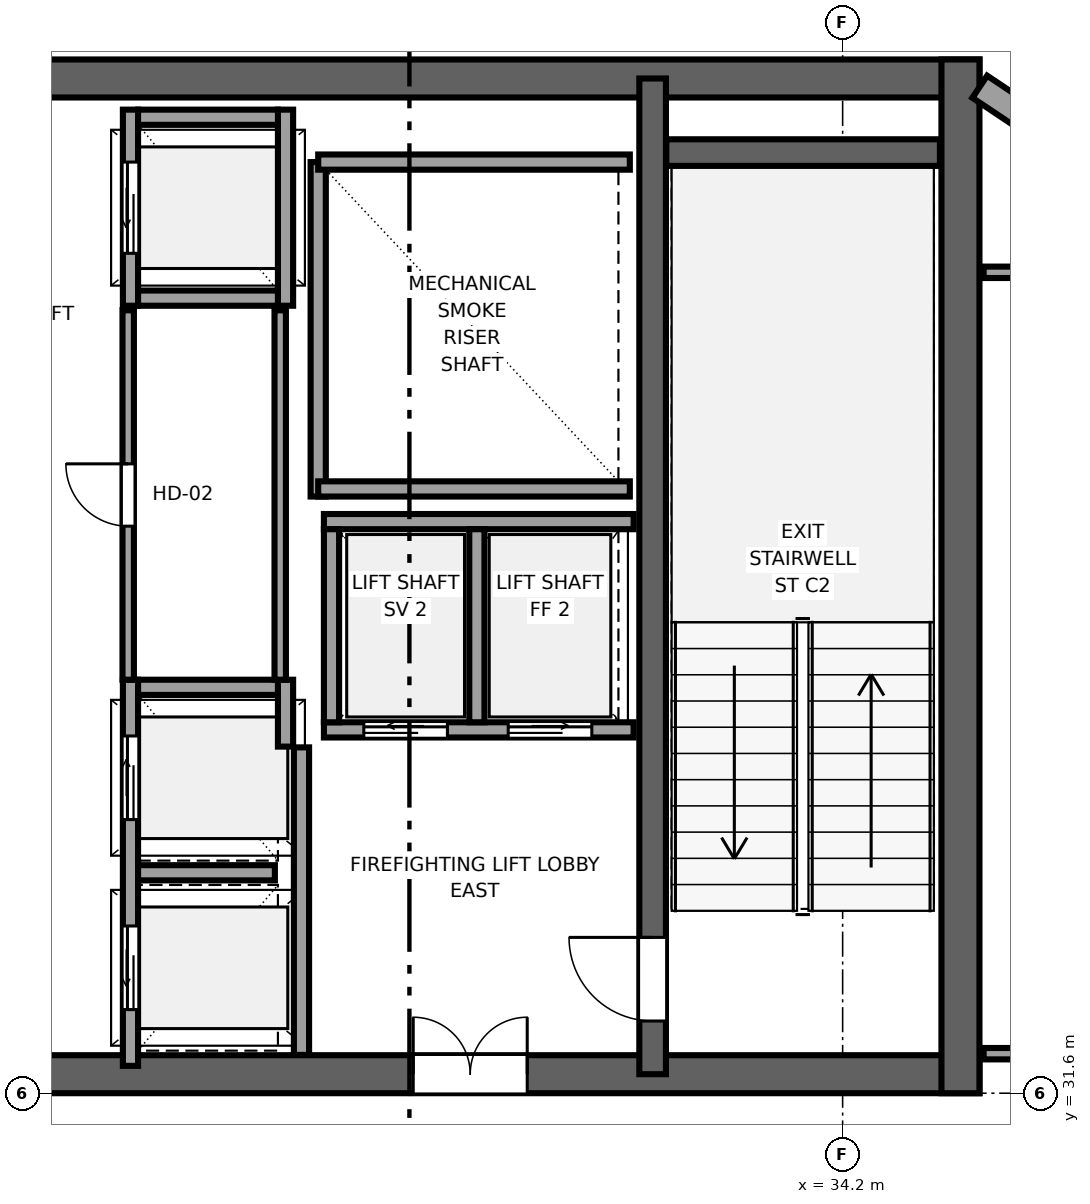
"""IFC4 building model, lengths in metres.
Left out: names, types, materials, properties, quantities, classifications, styles, units other than length and angle.
Written with IfcOpenShell. Run it as: python <this file> out.ifc"""

import sys

from ifc_helpers import new_model, si_unit, direction, frame, frame_2d, origin, place, context, subcontext, project, spatial, rectangle, extrude, source, transform, mapped, element, fill, save


model = new_model("IFC4")
c1 = context("Model", 3, precision=1e-05, world=origin(), true_north=direction((0.0, 1.0)))
c2 = subcontext(c1, "Body", "Model", "MODEL_VIEW")
j1 = project(units=[si_unit("LENGTHUNIT", "METRE"), si_unit("PLANEANGLEUNIT", "RADIAN")], contexts=[c1])
p1 = place(None, origin())
s1 = spatial("IfcSite", under=j1, at=p1, CompositionType="ELEMENT")
p2 = place(p1, origin())
s2 = spatial("IfcBuilding", under=s1, at=p2, CompositionType="ELEMENT")
p3 = place(p2, frame((0.0, 0.0, 286.55)))
s3 = spatial("IfcBuildingStorey", under=s2, at=p3, CompositionType="ELEMENT", Elevation=286.55)
p4 = place(p3, frame((10.0, 31.85, 0.0), z_axis=(0.0, 0.0, 1.0), x_axis=(1.0, 0.0, 0.0)))
e1 = element("IfcWall", 1, at=p4, inside=s3, PredefinedType="SHEAR", context=c2, shape_type="SweptSolid", body=[
    extrude(rectangle(XDim=26.0, YDim=0.5, at=frame_2d((13.0, 0.0))), origin(), (0.0, 0.0, 1.0), 4.4),
])
p5 = place(p4, frame((7.45, 0.0, 0.0), z_axis=(0.0, 0.0, 1.0), x_axis=(-1.0, 0.0, 0.0)))
e2 = element("IfcOpeningElement", 2, at=p5, cuts=e1, PredefinedType="OPENING", context=c2, shape_type="SweptSolid", body=[
    extrude(rectangle(XDim=1.5, YDim=2.04, at=frame_2d((0.75, 1.02))), frame((0.0, 0.26, 0.0), z_axis=(0.0, -1.0, 0.0), x_axis=(1.0, 0.0, 0.0)), (0.0, 0.0, 1.0), 0.52),
])
p6 = place(p4, frame((13.75, 0.0, 0.0), z_axis=(0.0, 0.0, 1.0), x_axis=(-1.0, 0.0, 0.0)))
e3 = element("IfcOpeningElement", 3, at=p6, cuts=e1, PredefinedType="OPENING", context=c2, shape_type="SweptSolid", body=[
    extrude(rectangle(XDim=1.5, YDim=2.04, at=frame_2d((0.75, 1.02))), frame((0.0, 0.26, 0.0), z_axis=(0.0, -1.0, 0.0), x_axis=(1.0, 0.0, 0.0)), (0.0, 0.0, 1.0), 0.52),
])
p7 = place(p4, frame((20.05, 0.0, 0.0), z_axis=(0.0, 0.0, 1.0), x_axis=(-1.0, 0.0, 0.0)))
e4 = element("IfcOpeningElement", 4, at=p7, cuts=e1, PredefinedType="OPENING", context=c2, shape_type="SweptSolid", body=[
    extrude(rectangle(XDim=1.5, YDim=2.04, at=frame_2d((0.75, 1.02))), frame((0.0, 0.26, 0.0), z_axis=(0.0, -1.0, 0.0), x_axis=(1.0, 0.0, 0.0)), (0.0, 0.0, 1.0), 0.52),
])
p8 = place(p3, frame((10.0, 44.95, 0.0), z_axis=(0.0, 0.0, 1.0), x_axis=(1.0, 0.0, 0.0)))
e5 = element("IfcWall", 5, at=p8, inside=s3, PredefinedType="SHEAR", context=c2, shape_type="SweptSolid", body=[
    extrude(rectangle(XDim=26.0, YDim=0.5, at=frame_2d((13.0, 0.0))), origin(), (0.0, 0.0, 1.0), 4.4),
])
p9 = place(p3, frame((35.75, 31.6, 0.0), z_axis=(0.0, 0.0, 1.0), x_axis=(0.0, 1.0, 0.0)))
e6 = element("IfcWall", 6, at=p9, inside=s3, PredefinedType="SHEAR", context=c2, shape_type="SweptSolid", body=[
    extrude(rectangle(XDim=13.6, YDim=0.5, at=frame_2d((6.8, 0.0))), origin(), (0.0, 0.0, 1.0), 4.4),
])
p10 = place(p3, frame((31.7, 31.85, 0.0), z_axis=(0.0, 0.0, 1.0), x_axis=(0.0, 1.0, 0.0)))
e7 = element("IfcWall", 7, at=p10, inside=s3, PredefinedType="SHEAR", context=c2, shape_type="SweptSolid", body=[
    extrude(rectangle(XDim=13.1, YDim=0.35, at=frame_2d((6.55, 0.0))), origin(), (0.0, 0.0, 1.0), 4.4),
])
p11 = place(p10, frame((1.8, 0.0, 0.0), z_axis=(0.0, 0.0, 1.0), x_axis=(-1.0, 0.0, 0.0)))
e8 = element("IfcOpeningElement", 8, at=p11, cuts=e7, PredefinedType="OPENING", context=c2, shape_type="SweptSolid", body=[
    extrude(rectangle(XDim=1.1, YDim=2.12, at=frame_2d((0.55, 1.06))), frame((0.0, 0.185, 0.0), z_axis=(0.0, -1.0, 0.0), x_axis=(1.0, 0.0, 0.0)), (0.0, 0.0, 1.0), 0.37),
])
p12 = place(p3, frame((31.88, 43.975, 0.0), z_axis=(0.0, 0.0, 1.0), x_axis=(1.0, 0.0, 0.0)))
e9 = element("IfcWall", 9, at=p12, inside=s3, PredefinedType="SHEAR", context=c2, shape_type="SweptSolid", body=[
    extrude(rectangle(XDim=3.6, YDim=0.35, at=frame_2d((1.8, 0.0))), origin(), (0.0, 0.0, 1.0), 4.4),
])
p13 = place(p3, frame((37.585, 43.785, 0.0), z_axis=(0.0, 0.0, 1.0), x_axis=(-0.831516639465, 0.555499845448, 0.0)))
e10 = element("IfcWall", 10, at=p13, inside=s3, PredefinedType="SOLIDWALL", context=c2, shape_type="SweptSolid", body=[
    extrude(rectangle(XDim=1.902, YDim=0.35, at=frame_2d((0.951, 0.0))), origin(), (0.0, 0.0, 1.0), 4.14),
])
p14 = place(p3, frame((27.3, 39.45, 0.0), z_axis=(0.0, 0.0, 1.0), x_axis=(0.0, 1.0, 0.0)))
e11 = element("IfcWall", 11, at=p14, inside=s3, PredefinedType="SOLIDWALL", context=c2, shape_type="SweptSolid", body=[
    extrude(rectangle(XDim=4.4, YDim=0.2, at=frame_2d((2.2, 0.0))), origin(), (0.0, 0.0, 1.0), 4.14),
])
for number, where, z_axis, x_axis in (
    (12, (27.3, 39.55, 0.0), (0.0, 0.0, 1.0), (1.0, 0.0, 0.0)),
    (13, (27.3, 43.85, 0.0), (0.0, 0.0, 1.0), (1.0, 0.0, 0.0)),
):
    element("IfcWall", number, at=place(p3, frame(where, z_axis=z_axis, x_axis=x_axis)), inside=s3, PredefinedType="SOLIDWALL", context=c2, shape_type="SweptSolid", body=[
        extrude(rectangle(XDim=4.1, YDim=0.2, at=frame_2d((2.05, 0.0))), origin(), (0.0, 0.0, 1.0), 4.14),
    ])
p15 = place(p3, frame((27.08, 32.104, 0.0), z_axis=(0.0, 0.0, 1.0), x_axis=(0.0, 1.0, 0.0)))
e14 = element("IfcWall", 14, at=p15, inside=s3, PredefinedType="SOLIDWALL", context=c2, shape_type="SweptSolid", body=[
    extrude(rectangle(XDim=4.046, YDim=0.2, at=frame_2d((2.023, 0.0))), origin(), (0.0, 0.0, 1.0), 4.14),
])
p16 = place(p3, frame((27.375, 36.38, 0.0), z_axis=(0.0, 0.0, 1.0), x_axis=(1.0, 0.0, 0.0)))
e15 = element("IfcWall", 15, at=p16, inside=s3, PredefinedType="SOLIDWALL", context=c2, shape_type="SweptSolid", body=[
    extrude(rectangle(XDim=4.075, YDim=0.2, at=frame_2d((2.038, 0.0))), origin(), (0.0, 0.0, 1.0), 4.14),
])
p17 = place(p16, frame((0.525, 0.0, 0.0)))
e16 = element("IfcOpeningElement", 16, at=p17, cuts=e15, PredefinedType="OPENING", context=c2, shape_type="SweptSolid", body=[
    extrude(rectangle(XDim=1.1, YDim=2.12, at=frame_2d((0.55, 1.06))), frame((0.0, 0.11, 0.0), z_axis=(0.0, -1.0, 0.0), x_axis=(1.0, 0.0, 0.0)), (0.0, 0.0, 1.0), 0.22),
])
p18 = place(p16, frame((2.425, 0.0, 0.0)))
e17 = element("IfcOpeningElement", 17, at=p18, cuts=e15, PredefinedType="OPENING", context=c2, shape_type="SweptSolid", body=[
    extrude(rectangle(XDim=1.1, YDim=2.12, at=frame_2d((0.55, 1.06))), frame((0.0, 0.11, 0.0), z_axis=(0.0, -1.0, 0.0), x_axis=(1.0, 0.0, 0.0)), (0.0, 0.0, 1.0), 0.22),
])
p19 = place(p3, frame((27.375, 39.12, 0.0), z_axis=(0.0, 0.0, 1.0), x_axis=(1.0, 0.0, 0.0)))
e18 = element("IfcWall", 18, at=p19, inside=s3, PredefinedType="SOLIDWALL", context=c2, shape_type="SweptSolid", body=[
    extrude(rectangle(XDim=4.075, YDim=0.2, at=frame_2d((2.038, 0.0))), origin(), (0.0, 0.0, 1.0), 4.14),
])
for number, where, z_axis, x_axis in (
    (19, (27.475, 36.48, 0.0), (0.0, 0.0, 1.0), (0.0, 1.0, 0.0)),
    (20, (29.387, 36.48, 0.0), (0.0, 0.0, 1.0), (0.0, 1.0, 0.0)),
):
    element("IfcWall", number, at=place(p3, frame(where, z_axis=z_axis, x_axis=x_axis)), inside=s3, PredefinedType="SOLIDWALL", context=c2, shape_type="SweptSolid", body=[
        extrude(rectangle(XDim=2.54, YDim=0.2, at=frame_2d((1.27, 0.0))), origin(), (0.0, 0.0, 1.0), 4.14),
    ])
p20 = place(p3, frame((24.83, 31.96, 0.0), z_axis=(0.0, 0.0, 1.0), x_axis=(0.0, 1.0, 0.0)))
e21 = element("IfcWall", 21, at=p20, inside=s3, PredefinedType="SOLIDWALL", context=c2, shape_type="SweptSolid", body=[
    extrude(rectangle(XDim=5.08, YDim=0.2, at=frame_2d((2.54, 0.0))), origin(), (0.0, 0.0, 1.0), 4.14),
])
p21 = place(p20, frame((0.74, 0.0, 0.0)))
e22 = element("IfcOpeningElement", 22, at=p21, cuts=e21, PredefinedType="OPENING", context=c2, shape_type="SweptSolid", body=[
    extrude(rectangle(XDim=1.1, YDim=2.12, at=frame_2d((0.55, 1.06))), frame((0.0, 0.11, 0.0), z_axis=(0.0, -1.0, 0.0), x_axis=(1.0, 0.0, 0.0)), (0.0, 0.0, 1.0), 0.22),
])
p22 = place(p20, frame((3.24, 0.0, 0.0)))
e23 = element("IfcOpeningElement", 23, at=p22, cuts=e21, PredefinedType="OPENING", context=c2, shape_type="SweptSolid", body=[
    extrude(rectangle(XDim=1.1, YDim=2.12, at=frame_2d((0.55, 1.06))), frame((0.0, 0.11, 0.0), z_axis=(0.0, -1.0, 0.0), x_axis=(1.0, 0.0, 0.0)), (0.0, 0.0, 1.0), 0.22),
])
p23 = place(p3, frame((26.87, 36.16, 0.0), z_axis=(0.0, 0.0, 1.0), x_axis=(0.0, 1.0, 0.0)))
e24 = element("IfcWall", 24, at=p23, inside=s3, PredefinedType="SOLIDWALL", context=c2, shape_type="SweptSolid", body=[
    extrude(rectangle(XDim=0.88, YDim=0.2, at=frame_2d((0.44, 0.0))), origin(), (0.0, 0.0, 1.0), 4.14),
])
p24 = place(p3, frame((24.93, 36.94, 0.0), z_axis=(0.0, 0.0, 1.0), x_axis=(1.0, 0.0, 0.0)))
e25 = element("IfcWall", 25, at=p24, inside=s3, PredefinedType="SOLIDWALL", context=c2, shape_type="SweptSolid", body=[
    extrude(rectangle(XDim=1.84, YDim=0.2, at=frame_2d((0.92, 0.0))), origin(), (0.0, 0.0, 1.0), 4.14),
])
p25 = place(p3, frame((24.93, 34.5, 0.0), z_axis=(0.0, 0.0, 1.0), x_axis=(1.0, 0.0, 0.0)))
e26 = element("IfcWall", 26, at=p25, inside=s3, PredefinedType="SOLIDWALL", context=c2, shape_type="SweptSolid", body=[
    extrude(rectangle(XDim=1.8, YDim=0.2, at=frame_2d((0.9, 0.0))), origin(), (0.0, 0.0, 1.0), 4.14),
])
p26 = place(p3, frame((24.83, 41.96, 0.0), z_axis=(0.0, 0.0, 1.0), x_axis=(0.0, 1.0, 0.0)))
e27 = element("IfcWall", 27, at=p26, inside=s3, PredefinedType="SOLIDWALL", context=c2, shape_type="SweptSolid", body=[
    extrude(rectangle(XDim=2.58, YDim=0.2, at=frame_2d((1.29, 0.0))), origin(), (0.0, 0.0, 1.0), 4.14),
])
p27 = place(p26, frame((0.69, 0.0, 0.0)))
e28 = element("IfcOpeningElement", 28, at=p27, cuts=e27, PredefinedType="OPENING", context=c2, shape_type="SweptSolid", body=[
    extrude(rectangle(XDim=1.2, YDim=2.15, at=frame_2d((0.6, 1.075))), frame((0.0, 0.11, 0.0), z_axis=(0.0, -1.0, 0.0), x_axis=(1.0, 0.0, 0.0)), (0.0, 0.0, 1.0), 0.22),
])
p28 = place(p3, frame((26.87, 41.96, 0.0), z_axis=(0.0, 0.0, 1.0), x_axis=(0.0, 1.0, 0.0)))
e29 = element("IfcWall", 29, at=p28, inside=s3, PredefinedType="SOLIDWALL", context=c2, shape_type="SweptSolid", body=[
    extrude(rectangle(XDim=2.58, YDim=0.2, at=frame_2d((1.29, 0.0))), origin(), (0.0, 0.0, 1.0), 4.14),
])
for number, where, z_axis, x_axis in (
    (30, (24.93, 42.06, 0.0), (0.0, 0.0, 1.0), (1.0, 0.0, 0.0)),
    (31, (24.93, 44.44, 0.0), (0.0, 0.0, 1.0), (1.0, 0.0, 0.0)),
):
    element("IfcWall", number, at=place(p3, frame(where, z_axis=z_axis, x_axis=x_axis)), inside=s3, PredefinedType="SOLIDWALL", context=c2, shape_type="SweptSolid", body=[
        extrude(rectangle(XDim=1.84, YDim=0.2, at=frame_2d((0.92, 0.0))), origin(), (0.0, 0.0, 1.0), 4.14),
    ])
p29 = place(p3, frame((24.8, 37.04, 0.0), z_axis=(0.0, 0.0, 1.0), x_axis=(0.0, 1.0, 0.0)))
e32 = element("IfcWall", 32, at=p29, inside=s3, PredefinedType="PARTITIONING", context=c2, shape_type="SweptSolid", body=[
    extrude(rectangle(XDim=4.86, YDim=0.15, at=frame_2d((2.43, 0.0))), origin(), (0.0, 0.0, 1.0), 4.14),
])
p30 = place(p29, frame((2.02, 0.0, 0.0)))
e33 = element("IfcOpeningElement", 33, at=p30, cuts=e32, PredefinedType="OPENING", context=c2, shape_type="SweptSolid", body=[
    extrude(rectangle(XDim=0.82, YDim=2.01, at=frame_2d((0.41, 1.005))), frame((0.0, 0.085, 0.0), z_axis=(0.0, -1.0, 0.0), x_axis=(1.0, 0.0, 0.0)), (0.0, 0.0, 1.0), 0.17),
])
p31 = place(p3, frame((26.8, 37.04, 0.0), z_axis=(0.0, 0.0, 1.0), x_axis=(0.0, 1.0, 0.0)))
e34 = element("IfcWall", 34, at=p31, inside=s3, PredefinedType="PARTITIONING", context=c2, shape_type="SweptSolid", body=[
    extrude(rectangle(XDim=4.86, YDim=0.15, at=frame_2d((2.43, 0.0))), origin(), (0.0, 0.0, 1.0), 4.14),
])
p32 = place(p3, frame((36.055, 32.12, 0.0), z_axis=(0.0, 0.0, 1.0), x_axis=(1.0, 0.0, 0.0)))
e35 = element("IfcWall", 35, at=p32, inside=s3, PredefinedType="PARTITIONING", context=c2, shape_type="SweptSolid", body=[
    extrude(rectangle(XDim=2.54, YDim=0.15, at=frame_2d((1.27, 0.0))), origin(), (0.0, 0.0, 1.0), 4.14),
])
p33 = place(p32, frame((0.76, 0.0, 0.0)))
e36 = element("IfcOpeningElement", 36, at=p33, cuts=e35, PredefinedType="OPENING", context=c2, shape_type="SweptSolid", body=[
    extrude(rectangle(XDim=1.02, YDim=2.03, at=frame_2d((0.51, 1.015))), frame((0.0, 0.085, 0.0), z_axis=(0.0, -1.0, 0.0), x_axis=(1.0, 0.0, 0.0)), (0.0, 0.0, 1.0), 0.17),
])
p34 = place(p3, frame((36.055, 42.4, 0.0), z_axis=(0.0, 0.0, 1.0), x_axis=(1.0, 0.0, 0.0)))
e37 = element("IfcWall", 37, at=p34, inside=s3, PredefinedType="PARTITIONING", context=c2, shape_type="SweptSolid", body=[
    extrude(rectangle(XDim=2.179, YDim=0.15, at=frame_2d((1.089, 0.0))), origin(), (0.0, 0.0, 1.0), 4.14),
])
m1 = source(origin(), c2, "Body", "SweptSolid", [
    extrude(rectangle(XDim=1.1, YDim=2.12, at=frame_2d((0.55, 1.06))), frame((0.0, 0.025, 0.0), z_axis=(0.0, -1.0, 0.0), x_axis=(1.0, 0.0, 0.0)), (0.0, 0.0, 1.0), 0.05),
])
p35 = place(p11, origin())
e38 = element("IfcDoor", 38, at=p35, inside=s3, OperationType="SINGLE_SWING_RIGHT", PredefinedType="DOOR", context=c2, shape_type="MappedRepresentation", body=[
    mapped(m1, transform((0.0, 0.0, 0.0), x_axis=(1.0, 0.0, 0.0), y_axis=(0.0, 1.0, 0.0), z_axis=(0.0, 0.0, 1.0), scale=1.0)),
])
fill(e8, e38)
m2 = source(origin(), c2, "Body", "SweptSolid", [
    extrude(rectangle(XDim=1.5, YDim=2.04, at=frame_2d((0.75, 1.02))), frame((0.0, 0.025, 0.0), z_axis=(0.0, -1.0, 0.0), x_axis=(1.0, 0.0, 0.0)), (0.0, 0.0, 1.0), 0.05),
])
p36 = place(p7, origin())
e39 = element("IfcDoor", 39, at=p36, inside=s3, OperationType="DOUBLE_DOOR_SINGLE_SWING", PredefinedType="DOOR", context=c2, shape_type="MappedRepresentation", body=[
    mapped(m2, transform((0.0, 0.0, 0.0), x_axis=(1.0, 0.0, 0.0), y_axis=(0.0, 1.0, 0.0), z_axis=(0.0, 0.0, 1.0), scale=1.0)),
])
fill(e4, e39)
m3 = source(origin(), c2, "Body", "SweptSolid", [
    extrude(rectangle(XDim=1.1, YDim=2.12, at=frame_2d((0.55, 1.06))), frame((0.0, 0.025, 0.0), z_axis=(0.0, -1.0, 0.0), x_axis=(1.0, 0.0, 0.0)), (0.0, 0.0, 1.0), 0.05),
])
p37 = place(p17, origin())
e40 = element("IfcDoor", 40, at=p37, inside=s3, OperationType="SLIDING_TO_LEFT", PredefinedType="DOOR", context=c2, shape_type="MappedRepresentation", body=[
    mapped(m3, transform((0.0, 0.0, 0.0), x_axis=(1.0, 0.0, 0.0), y_axis=(0.0, 1.0, 0.0), z_axis=(0.0, 0.0, 1.0), scale=1.0)),
])
fill(e16, e40)
p38 = place(p18, origin())
e41 = element("IfcDoor", 41, at=p38, inside=s3, OperationType="SLIDING_TO_RIGHT", PredefinedType="DOOR", context=c2, shape_type="MappedRepresentation", body=[
    mapped(m3, transform((0.0, 0.0, 0.0), x_axis=(1.0, 0.0, 0.0), y_axis=(0.0, 1.0, 0.0), z_axis=(0.0, 0.0, 1.0), scale=1.0)),
])
fill(e17, e41)
p39 = place(p21, origin())
e42 = element("IfcDoor", 42, at=p39, inside=s3, OperationType="SLIDING_TO_LEFT", PredefinedType="DOOR", context=c2, shape_type="MappedRepresentation", body=[
    mapped(m3, transform((0.0, 0.0, 0.0), x_axis=(1.0, 0.0, 0.0), y_axis=(0.0, 1.0, 0.0), z_axis=(0.0, 0.0, 1.0), scale=1.0)),
])
fill(e22, e42)
p40 = place(p22, origin())
e43 = element("IfcDoor", 43, at=p40, inside=s3, OperationType="SLIDING_TO_RIGHT", PredefinedType="DOOR", context=c2, shape_type="MappedRepresentation", body=[
    mapped(m3, transform((0.0, 0.0, 0.0), x_axis=(1.0, 0.0, 0.0), y_axis=(0.0, 1.0, 0.0), z_axis=(0.0, 0.0, 1.0), scale=1.0)),
])
fill(e23, e43)
m4 = source(origin(), c2, "Body", "SweptSolid", [
    extrude(rectangle(XDim=1.2, YDim=2.15, at=frame_2d((0.6, 1.075))), frame((0.0, 0.025, 0.0), z_axis=(0.0, -1.0, 0.0), x_axis=(1.0, 0.0, 0.0)), (0.0, 0.0, 1.0), 0.05),
])
p41 = place(p27, origin())
e44 = element("IfcDoor", 44, at=p41, inside=s3, OperationType="SLIDING_TO_LEFT", PredefinedType="DOOR", context=c2, shape_type="MappedRepresentation", body=[
    mapped(m4, transform((0.0, 0.0, 0.0), x_axis=(1.0, 0.0, 0.0), y_axis=(0.0, 1.0, 0.0), z_axis=(0.0, 0.0, 1.0), scale=1.0)),
])
fill(e28, e44)
m5 = source(origin(), c2, "Body", "SweptSolid", [
    extrude(rectangle(XDim=0.82, YDim=2.01, at=frame_2d((0.41, 1.005))), frame((0.0, 0.025, 0.0), z_axis=(0.0, -1.0, 0.0), x_axis=(1.0, 0.0, 0.0)), (0.0, 0.0, 1.0), 0.05),
])
p42 = place(p30, origin())
e45 = element("IfcDoor", 45, at=p42, inside=s3, OperationType="SINGLE_SWING_RIGHT", PredefinedType="DOOR", context=c2, shape_type="MappedRepresentation", body=[
    mapped(m5, transform((0.0, 0.0, 0.0), x_axis=(1.0, 0.0, 0.0), y_axis=(0.0, 1.0, 0.0), z_axis=(0.0, 0.0, 1.0), scale=1.0)),
])
fill(e33, e45)
save(model, sys.argv[1])
